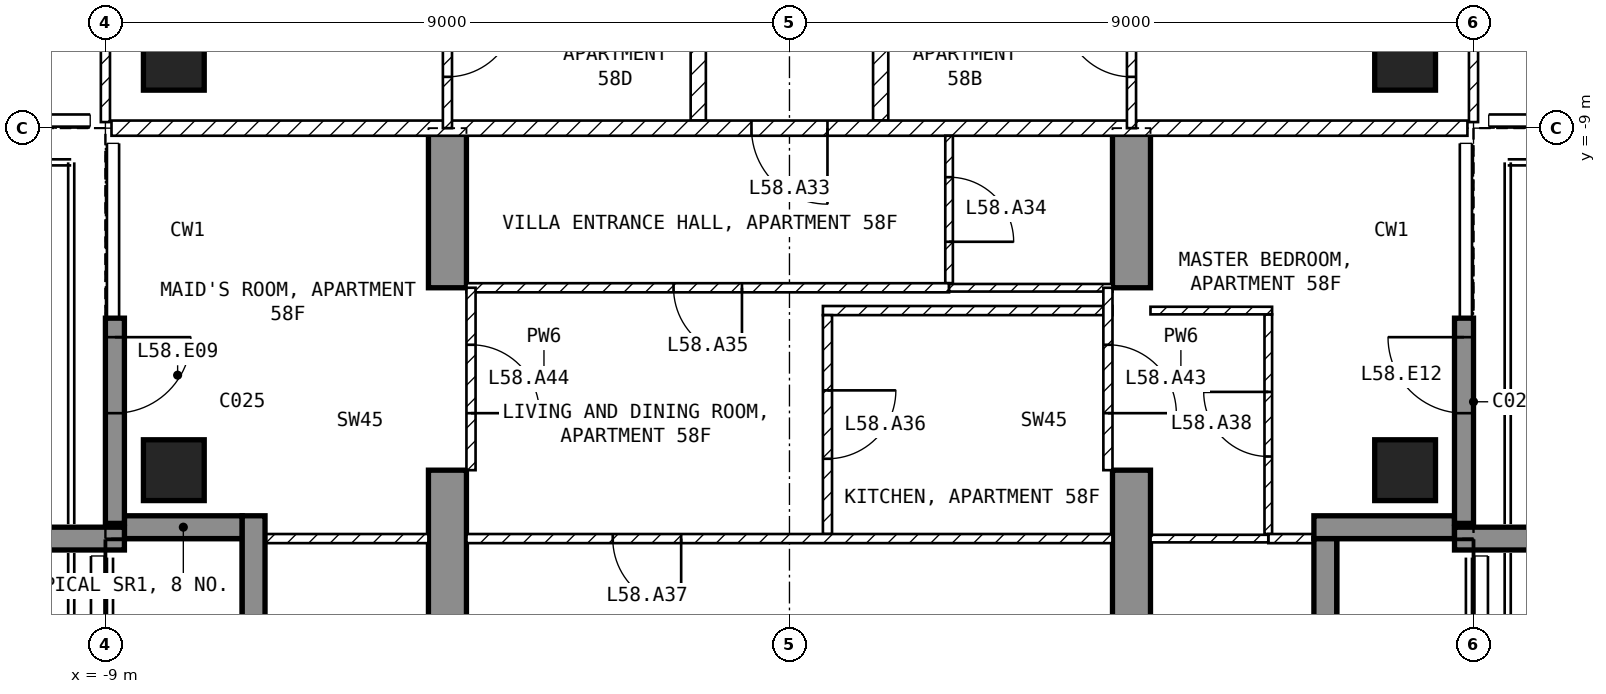
"""IFC4 building model, lengths in metres.
Left out: names, types, materials, properties, quantities, classifications, styles, units other than length and angle.
Written with IfcOpenShell. Run it as: python <this file> out.ifc"""

import sys

from ifc_helpers import new_model, si_unit, direction, frame, frame_2d, origin, origin_2d, place, context, subcontext, project, spatial, polyline, rectangle, outline, extrude, element, fill, save


model = new_model("IFC4")
c1 = context("Model", 3, precision=1e-05, world=origin(), true_north=direction((0.0, 1.0)))
c2 = subcontext(c1, "Body", "Model", "MODEL_VIEW")
j1 = project(units=[si_unit("LENGTHUNIT", "METRE"), si_unit("PLANEANGLEUNIT", "RADIAN")], contexts=[c1])
p1 = place(None, origin())
s1 = spatial("IfcSite", under=j1, at=p1, CompositionType="ELEMENT")
p2 = place(p1, origin())
s2 = spatial("IfcBuilding", under=s1, at=p2, CompositionType="ELEMENT")
p3 = place(p2, frame((0.0, 0.0, 232.5)))
s3 = spatial("IfcBuildingStorey", under=s2, at=p3, CompositionType="ELEMENT", Elevation=232.5)
for number, where, z_axis, x_axis in (
    (1, (-8.1, -13.5, -0.25), (0.0, 0.0, 1.0), (1.0, 0.0, 0.0)),
    (2, (-8.1, -8.1, -0.25), (0.0, 0.0, 1.0), (1.0, 0.0, 0.0)),
    (3, (8.1, -13.5, -0.25), (0.0, 0.0, 1.0), (1.0, 0.0, 0.0)),
    (4, (8.1, -8.1, -0.25), (0.0, 0.0, 1.0), (1.0, 0.0, 0.0)),
):
    element("IfcColumn", number, at=place(p3, frame(where, z_axis=z_axis, x_axis=x_axis)), inside=s3, PredefinedType="COLUMN", context=c2, shape_type="SweptSolid", body=[
        extrude(rectangle(XDim=0.8, YDim=0.8, at=origin_2d()), origin(), (0.0, 0.0, 1.0), 3.5),
    ])
for number, where, z_axis, x_axis in (
    (5, (-4.75, -16.7, -0.25), (1.0, 0.0, 0.0), (0.0, 1.0, 0.0)),
    (6, (4.25, -16.7, -0.25), (1.0, 0.0, 0.0), (0.0, 1.0, 0.0)),
):
    element("IfcWall", number, at=place(p3, frame(where, z_axis=z_axis, x_axis=x_axis)), inside=s3, PredefinedType="SHEAR", context=c2, shape_type="SweptSolid", body=[
        extrude(outline(polyline([(0.0, 0.0), (3.2, 0.0), (3.2, 2.65), (5.6, 2.65), (5.6, 0.0), (7.7, 0.0), (7.7, 3.5), (0.0, 3.5), (0.0, 0.0)])), origin(), (0.0, 0.0, 1.0), 0.5),
    ])
p4 = place(p3, frame((-8.875, -11.5, 0.0), z_axis=(0.0, 0.0, 1.0), x_axis=(0.0, -1.0, 0.0)))
e7 = element("IfcWall", 7, at=p4, inside=s3, PredefinedType="SOLIDWALL", context=c2, shape_type="SweptSolid", body=[
    extrude(rectangle(XDim=2.7, YDim=0.25, at=frame_2d((1.35, 0.0))), origin(), (0.0, 0.0, 1.0), 3.25),
])
p5 = place(p4, frame((0.25, 0.0, 0.0)))
e8 = element("IfcOpeningElement", 8, at=p5, cuts=e7, PredefinedType="OPENING", context=c2, shape_type="SweptSolid", body=[
    extrude(rectangle(XDim=1.0, YDim=2.4, at=frame_2d((0.5, 1.2))), frame((0.0, 0.135, 0.0), z_axis=(0.0, -1.0, 0.0), x_axis=(1.0, 0.0, 0.0)), (0.0, 0.0, 1.0), 0.27),
])
p6 = place(p3, frame((8.875, -14.2, 0.0), z_axis=(0.0, 0.0, 1.0), x_axis=(0.0, 1.0, 0.0)))
e9 = element("IfcWall", 9, at=p6, inside=s3, PredefinedType="SOLIDWALL", context=c2, shape_type="SweptSolid", body=[
    extrude(rectangle(XDim=2.7, YDim=0.25, at=frame_2d((1.35, 0.0))), origin(), (0.0, 0.0, 1.0), 3.25),
])
p7 = place(p6, frame((1.45, 0.0, 0.0)))
e10 = element("IfcOpeningElement", 10, at=p7, cuts=e9, PredefinedType="OPENING", context=c2, shape_type="SweptSolid", body=[
    extrude(rectangle(XDim=1.0, YDim=2.4, at=frame_2d((0.5, 1.2))), frame((0.0, 0.135, 0.0), z_axis=(0.0, -1.0, 0.0), x_axis=(1.0, 0.0, 0.0)), (0.0, 0.0, 1.0), 0.27),
])
p8 = place(p3, frame((7.05, -16.2, 0.0), z_axis=(0.0, 0.0, 1.0), x_axis=(0.0, 1.0, 0.0)))
e11 = element("IfcWall", 11, at=p8, inside=s3, PredefinedType="SOLIDWALL", context=c2, shape_type="SweptSolid", body=[
    extrude(rectangle(XDim=1.8, YDim=0.3, at=frame_2d((0.9, 0.0))), origin(), (0.0, 0.0, 1.0), 3.25),
])
p9 = place(p3, frame((6.9, -14.25, 0.0), z_axis=(0.0, 0.0, 1.0), x_axis=(1.0, 0.0, 0.0)))
e12 = element("IfcWall", 12, at=p9, inside=s3, PredefinedType="SOLIDWALL", context=c2, shape_type="SweptSolid", body=[
    extrude(rectangle(XDim=1.85, YDim=0.3, at=frame_2d((0.925, 0.0))), origin(), (0.0, 0.0, 1.0), 3.25),
])
p10 = place(p3, frame((-8.75, -14.25, 0.0), z_axis=(0.0, 0.0, 1.0), x_axis=(1.0, 0.0, 0.0)))
e13 = element("IfcWall", 13, at=p10, inside=s3, PredefinedType="SOLIDWALL", context=c2, shape_type="SweptSolid", body=[
    extrude(rectangle(XDim=1.55, YDim=0.3, at=frame_2d((0.775, 0.0))), origin(), (0.0, 0.0, 1.0), 3.25),
])
p11 = place(p3, frame((-7.05, -14.1, 0.0), z_axis=(0.0, 0.0, 1.0), x_axis=(0.0, -1.0, 0.0)))
e14 = element("IfcWall", 14, at=p11, inside=s3, PredefinedType="SOLIDWALL", context=c2, shape_type="SweptSolid", body=[
    extrude(rectangle(XDim=1.8, YDim=0.3, at=frame_2d((0.9, 0.0))), origin(), (0.0, 0.0, 1.0), 3.25),
])
for number, where, z_axis, x_axis in (
    (15, (-8.75, -14.4, 0.0), (0.0, 0.0, 1.0), (-1.0, 0.0, 0.0)),
    (16, (8.75, -14.4, 0.0), (0.0, 0.0, 1.0), (1.0, 0.0, 0.0)),
):
    element("IfcWall", number, at=place(p3, frame(where, z_axis=z_axis, x_axis=x_axis)), inside=s3, PredefinedType="SOLIDWALL", context=c2, shape_type="SweptSolid", body=[
        extrude(rectangle(XDim=2.95, YDim=0.3, at=frame_2d((1.475, 0.0))), origin(), (0.0, 0.0, 1.0), 3.25),
    ])
for number, where, z_axis, x_axis in (
    (17, (1.2, -4.6, 0.0), (0.0, 0.0, 1.0), (0.0, -1.0, 0.0)),
    (18, (-1.2, -8.9, 0.0), (0.0, 0.0, 1.0), (0.0, 1.0, 0.0)),
):
    element("IfcWall", number, at=place(p3, frame(where, z_axis=z_axis, x_axis=x_axis)), inside=s3, PredefinedType="PARTITIONING", context=c2, shape_type="SweptSolid", body=[
        extrude(rectangle(XDim=4.3, YDim=0.2, at=frame_2d((2.15, 0.0))), origin(), (0.0, 0.0, 1.0), 3.25),
    ])
p12 = place(p3, frame((8.92, -9.0, 0.0), z_axis=(0.0, 0.0, 1.0), x_axis=(-1.0, 0.0, 0.0)))
e19 = element("IfcWall", 19, at=p12, inside=s3, PredefinedType="PARTITIONING", context=c2, shape_type="SweptSolid", body=[
    extrude(rectangle(XDim=17.84, YDim=0.2, at=frame_2d((8.92, 0.0))), origin(), (0.0, 0.0, 1.0), 3.25),
])
p13 = place(p12, frame((8.42, 0.0, 0.0)))
e20 = element("IfcOpeningElement", 20, at=p13, cuts=e19, PredefinedType="OPENING", context=c2, shape_type="SweptSolid", body=[
    extrude(rectangle(XDim=1.0, YDim=2.1, at=frame_2d((0.5, 1.05))), frame((0.0, 0.11, 0.0), z_axis=(0.0, -1.0, 0.0), x_axis=(1.0, 0.0, 0.0)), (0.0, 0.0, 1.0), 0.22),
])
p14 = place(p3, frame((9.0, -8.92, 0.0), z_axis=(0.0, 0.0, 1.0), x_axis=(0.0, 1.0, 0.0)))
e21 = element("IfcWall", 21, at=p14, inside=s3, PredefinedType="PARTITIONING", context=c2, shape_type="SweptSolid", body=[
    extrude(rectangle(XDim=7.62, YDim=0.12, at=frame_2d((3.81, 0.0))), origin(), (0.0, 0.0, 1.0), 3.25),
])
p15 = place(p14, frame((6.32, 0.0, 0.0)))
e22 = element("IfcOpeningElement", 22, at=p15, cuts=e21, PredefinedType="OPENING", context=c2, shape_type="SweptSolid", body=[
    extrude(rectangle(XDim=0.9, YDim=2.1, at=frame_2d((0.45, 1.05))), frame((0.0, 0.07, 0.0), z_axis=(0.0, -1.0, 0.0), x_axis=(1.0, 0.0, 0.0)), (0.0, 0.0, 1.0), 0.14),
])
p16 = place(p3, frame((4.5, -9.0, 0.0), z_axis=(0.0, 0.0, 1.0), x_axis=(0.0, 1.0, 0.0)))
e23 = element("IfcWall", 23, at=p16, inside=s3, PredefinedType="PARTITIONING", context=c2, shape_type="SweptSolid", body=[
    extrude(rectangle(XDim=2.25, YDim=0.12, at=frame_2d((1.125, 0.0))), origin(), (0.0, 0.0, 1.0), 3.25),
])
p17 = place(p16, frame((0.675, 0.0, 0.0)))
e24 = element("IfcOpeningElement", 24, at=p17, cuts=e23, PredefinedType="OPENING", context=c2, shape_type="SweptSolid", body=[
    extrude(rectangle(XDim=0.9, YDim=2.1, at=frame_2d((0.45, 1.05))), frame((0.0, 0.07, 0.0), z_axis=(0.0, -1.0, 0.0), x_axis=(1.0, 0.0, 0.0)), (0.0, 0.0, 1.0), 0.14),
])
p18 = place(p3, frame((-9.0, -1.3, 0.0), z_axis=(0.0, 0.0, 1.0), x_axis=(0.0, -1.0, 0.0)))
e25 = element("IfcWall", 25, at=p18, inside=s3, PredefinedType="PARTITIONING", context=c2, shape_type="SweptSolid", body=[
    extrude(rectangle(XDim=7.62, YDim=0.12, at=frame_2d((3.81, 0.0))), origin(), (0.0, 0.0, 1.0), 3.25),
])
p19 = place(p18, frame((0.85, 0.0, 0.0)))
e26 = element("IfcOpeningElement", 26, at=p19, cuts=e25, PredefinedType="OPENING", context=c2, shape_type="SweptSolid", body=[
    extrude(rectangle(XDim=0.9, YDim=2.1, at=frame_2d((0.45, 1.05))), frame((0.0, 0.07, 0.0), z_axis=(0.0, -1.0, 0.0), x_axis=(1.0, 0.0, 0.0)), (0.0, 0.0, 1.0), 0.14),
])
p20 = place(p3, frame((-4.5, -6.75, 0.0), z_axis=(0.0, 0.0, 1.0), x_axis=(0.0, -1.0, 0.0)))
e27 = element("IfcWall", 27, at=p20, inside=s3, PredefinedType="PARTITIONING", context=c2, shape_type="SweptSolid", body=[
    extrude(rectangle(XDim=2.25, YDim=0.12, at=frame_2d((1.125, 0.0))), origin(), (0.0, 0.0, 1.0), 3.25),
])
p21 = place(p20, frame((0.675, 0.0, 0.0)))
e28 = element("IfcOpeningElement", 28, at=p21, cuts=e27, PredefinedType="OPENING", context=c2, shape_type="SweptSolid", body=[
    extrude(rectangle(XDim=0.9, YDim=2.1, at=frame_2d((0.45, 1.05))), frame((0.0, 0.07, 0.0), z_axis=(0.0, -1.0, 0.0), x_axis=(1.0, 0.0, 0.0)), (0.0, 0.0, 1.0), 0.14),
])
p22 = place(p3, frame((2.1, -9.1, 0.0), z_axis=(0.0, 0.0, 1.0), x_axis=(0.0, -1.0, 0.0)))
e29 = element("IfcWall", 29, at=p22, inside=s3, PredefinedType="PARTITIONING", context=c2, shape_type="SweptSolid", body=[
    extrude(rectangle(XDim=1.94, YDim=0.1, at=frame_2d((0.97, 0.0))), origin(), (0.0, 0.0, 1.0), 3.25),
])
p23 = place(p22, frame((0.545, 0.0, 0.0)))
e30 = element("IfcOpeningElement", 30, at=p23, cuts=e29, PredefinedType="OPENING", context=c2, shape_type="SweptSolid", body=[
    extrude(rectangle(XDim=0.85, YDim=2.1, at=frame_2d((0.425, 1.05))), frame((0.0, 0.06, 0.0), z_axis=(0.0, -1.0, 0.0), x_axis=(1.0, 0.0, 0.0)), (0.0, 0.0, 1.0), 0.12),
])
p24 = place(p3, frame((2.1, -11.1, 0.0), z_axis=(0.0, 0.0, 1.0), x_axis=(-1.0, 0.0, 0.0)))
e31 = element("IfcWall", 31, at=p24, inside=s3, PredefinedType="PARTITIONING", context=c2, shape_type="SweptSolid", body=[
    extrude(rectangle(XDim=6.35, YDim=0.12, at=frame_2d((3.175, 0.0))), origin(), (0.0, 0.0, 1.0), 3.25),
])
p25 = place(p24, frame((2.725, 0.0, 0.0)))
e32 = element("IfcOpeningElement", 32, at=p25, cuts=e31, PredefinedType="OPENING", context=c2, shape_type="SweptSolid", body=[
    extrude(rectangle(XDim=0.9, YDim=2.1, at=frame_2d((0.45, 1.05))), frame((0.0, 0.07, 0.0), z_axis=(0.0, -1.0, 0.0), x_axis=(1.0, 0.0, 0.0)), (0.0, 0.0, 1.0), 0.14),
])
p26 = place(p3, frame((4.25, -11.1, 0.0), z_axis=(0.0, 0.0, 1.0), x_axis=(-1.0, 0.0, 0.0)))
e33 = element("IfcWall", 33, at=p26, inside=s3, PredefinedType="PARTITIONING", context=c2, shape_type="SweptSolid", body=[
    extrude(rectangle(XDim=2.15, YDim=0.1, at=frame_2d((1.075, 0.0))), origin(), (0.0, 0.0, 1.0), 3.25),
])
p27 = place(p3, frame((4.25, -11.4, 0.0), z_axis=(0.0, 0.0, 1.0), x_axis=(-1.0, 0.0, 0.0)))
e34 = element("IfcWall", 34, at=p27, inside=s3, PredefinedType="PARTITIONING", context=c2, shape_type="SweptSolid", body=[
    extrude(rectangle(XDim=3.81, YDim=0.12, at=frame_2d((1.905, 0.0))), origin(), (0.0, 0.0, 1.0), 3.25),
])
p28 = place(p3, frame((0.5, -11.46, 0.0), z_axis=(0.0, 0.0, 1.0), x_axis=(0.0, -1.0, 0.0)))
e35 = element("IfcWall", 35, at=p28, inside=s3, PredefinedType="PARTITIONING", context=c2, shape_type="SweptSolid", body=[
    extrude(rectangle(XDim=2.88, YDim=0.12, at=frame_2d((1.44, 0.0))), origin(), (0.0, 0.0, 1.0), 3.25),
])
p29 = place(p28, frame((0.99, 0.0, 0.0)))
e36 = element("IfcOpeningElement", 36, at=p29, cuts=e35, PredefinedType="OPENING", context=c2, shape_type="SweptSolid", body=[
    extrude(rectangle(XDim=0.9, YDim=2.1, at=frame_2d((0.45, 1.05))), frame((0.0, 0.07, 0.0), z_axis=(0.0, -1.0, 0.0), x_axis=(1.0, 0.0, 0.0)), (0.0, 0.0, 1.0), 0.14),
])
p30 = place(p3, frame((4.25, -14.4, 0.0), z_axis=(0.0, 0.0, 1.0), x_axis=(-1.0, 0.0, 0.0)))
e37 = element("IfcWall", 37, at=p30, inside=s3, PredefinedType="PARTITIONING", context=c2, shape_type="SweptSolid", body=[
    extrude(rectangle(XDim=8.5, YDim=0.12, at=frame_2d((4.25, 0.0))), origin(), (0.0, 0.0, 1.0), 3.25),
])
p31 = place(p30, frame((5.675, 0.0, 0.0)))
e38 = element("IfcOpeningElement", 38, at=p31, cuts=e37, PredefinedType="OPENING", context=c2, shape_type="SweptSolid", body=[
    extrude(rectangle(XDim=0.9, YDim=2.1, at=frame_2d((0.45, 1.05))), frame((0.0, 0.07, 0.0), z_axis=(0.0, -1.0, 0.0), x_axis=(1.0, 0.0, 0.0)), (0.0, 0.0, 1.0), 0.14),
])
p32 = place(p3, frame((6.3, -14.34, 0.0), z_axis=(0.0, 0.0, 1.0), x_axis=(0.0, 1.0, 0.0)))
e39 = element("IfcWall", 39, at=p32, inside=s3, PredefinedType="PARTITIONING", context=c2, shape_type="SweptSolid", body=[
    extrude(rectangle(XDim=2.89, YDim=0.1, at=frame_2d((1.445, 0.0))), origin(), (0.0, 0.0, 1.0), 3.25),
])
p33 = place(p32, frame((1.02, 0.0, 0.0)))
e40 = element("IfcOpeningElement", 40, at=p33, cuts=e39, PredefinedType="OPENING", context=c2, shape_type="SweptSolid", body=[
    extrude(rectangle(XDim=0.85, YDim=2.1, at=frame_2d((0.425, 1.05))), frame((0.0, 0.06, 0.0), z_axis=(0.0, -1.0, 0.0), x_axis=(1.0, 0.0, 0.0)), (0.0, 0.0, 1.0), 0.12),
])
p34 = place(p3, frame((6.35, -11.4, 0.0), z_axis=(0.0, 0.0, 1.0), x_axis=(-1.0, 0.0, 0.0)))
e41 = element("IfcWall", 41, at=p34, inside=s3, PredefinedType="PARTITIONING", context=c2, shape_type="SweptSolid", body=[
    extrude(rectangle(XDim=1.6, YDim=0.1, at=frame_2d((0.8, 0.0))), origin(), (0.0, 0.0, 1.0), 3.25),
])
p35 = place(p3, frame((7.12, -14.4, 0.0), z_axis=(0.0, 0.0, 1.0), x_axis=(-1.0, 0.0, 0.0)))
e42 = element("IfcWall", 42, at=p35, inside=s3, PredefinedType="PARTITIONING", context=c2, shape_type="SweptSolid", body=[
    extrude(rectangle(XDim=0.82, YDim=0.12, at=frame_2d((0.41, 0.0))), origin(), (0.0, 0.0, 1.0), 3.25),
])
p36 = place(p3, frame((6.3, -14.4, 0.0), z_axis=(0.0, 0.0, 1.0), x_axis=(-1.0, 0.0, 0.0)))
e43 = element("IfcWall", 43, at=p36, inside=s3, PredefinedType="PARTITIONING", context=c2, shape_type="SweptSolid", body=[
    extrude(rectangle(XDim=1.55, YDim=0.1, at=frame_2d((0.775, 0.0))), origin(), (0.0, 0.0, 1.0), 3.25),
])
p37 = place(p3, frame((-4.75, -14.4, 0.0), z_axis=(0.0, 0.0, 1.0), x_axis=(-1.0, 0.0, 0.0)))
e44 = element("IfcWall", 44, at=p37, inside=s3, PredefinedType="PARTITIONING", context=c2, shape_type="SweptSolid", body=[
    extrude(rectangle(XDim=2.37, YDim=0.12, at=frame_2d((1.185, 0.0))), origin(), (0.0, 0.0, 1.0), 3.25),
])
p38 = place(p3, frame((4.19, -11.1, 0.0), z_axis=(0.0, 0.0, 1.0), x_axis=(0.0, -1.0, 0.0)))
e45 = element("IfcWall", 45, at=p38, inside=s3, PredefinedType="PARTITIONING", context=c2, shape_type="SweptSolid", body=[
    extrude(rectangle(XDim=2.4, YDim=0.12, at=frame_2d((1.2, 0.0))), origin(), (0.0, 0.0, 1.0), 2.4),
])
p39 = place(p38, frame((0.75, 0.0, 0.0)))
e46 = element("IfcOpeningElement", 46, at=p39, cuts=e45, PredefinedType="OPENING", context=c2, shape_type="SweptSolid", body=[
    extrude(rectangle(XDim=0.9, YDim=2.1, at=frame_2d((0.45, 1.05))), frame((0.0, 0.07, 0.0), z_axis=(0.0, -1.0, 0.0), x_axis=(1.0, 0.0, 0.0)), (0.0, 0.0, 1.0), 0.14),
])
p40 = place(p3, frame((-4.19, -11.1, 0.0), z_axis=(0.0, 0.0, 1.0), x_axis=(0.0, -1.0, 0.0)))
e47 = element("IfcWall", 47, at=p40, inside=s3, PredefinedType="PARTITIONING", context=c2, shape_type="SweptSolid", body=[
    extrude(rectangle(XDim=2.4, YDim=0.12, at=frame_2d((1.2, 0.0))), origin(), (0.0, 0.0, 1.0), 2.4),
])
p41 = place(p40, frame((0.75, 0.0, 0.0)))
e48 = element("IfcOpeningElement", 48, at=p41, cuts=e47, PredefinedType="OPENING", context=c2, shape_type="SweptSolid", body=[
    extrude(rectangle(XDim=0.9, YDim=2.1, at=frame_2d((0.45, 1.05))), frame((0.0, 0.07, 0.0), z_axis=(0.0, -1.0, 0.0), x_axis=(1.0, 0.0, 0.0)), (0.0, 0.0, 1.0), 0.14),
])
p42 = place(p5, origin())
e49 = element("IfcDoor", 49, at=p42, inside=s3, OperationType="SINGLE_SWING_LEFT", PredefinedType="DOOR", context=c2, shape_type="SweptSolid", body=[
    extrude(rectangle(XDim=1.0, YDim=2.4, at=frame_2d((0.5, 1.2))), frame((0.0, 0.025, 0.0), z_axis=(0.0, -1.0, 0.0), x_axis=(1.0, 0.0, 0.0)), (0.0, 0.0, 1.0), 0.05),
])
fill(e8, e49)
p43 = place(p7, origin())
e50 = element("IfcDoor", 50, at=p43, inside=s3, OperationType="SINGLE_SWING_RIGHT", PredefinedType="DOOR", context=c2, shape_type="SweptSolid", body=[
    extrude(rectangle(XDim=1.0, YDim=2.4, at=frame_2d((0.5, 1.2))), frame((0.0, 0.025, 0.0), z_axis=(0.0, -1.0, 0.0), x_axis=(1.0, 0.0, 0.0)), (0.0, 0.0, 1.0), 0.05),
])
fill(e10, e50)
p44 = place(p17, origin())
e51 = element("IfcDoor", 51, at=p44, inside=s3, OperationType="SINGLE_SWING_RIGHT", PredefinedType="DOOR", context=c2, shape_type="SweptSolid", body=[
    extrude(rectangle(XDim=0.9, YDim=2.1, at=frame_2d((0.45, 1.05))), frame((0.0, 0.025, 0.0), z_axis=(0.0, -1.0, 0.0), x_axis=(1.0, 0.0, 0.0)), (0.0, 0.0, 1.0), 0.05),
])
fill(e24, e51)
p45 = place(p21, origin())
e52 = element("IfcDoor", 52, at=p45, inside=s3, OperationType="SINGLE_SWING_LEFT", PredefinedType="DOOR", context=c2, shape_type="SweptSolid", body=[
    extrude(rectangle(XDim=0.9, YDim=2.1, at=frame_2d((0.45, 1.05))), frame((0.0, 0.025, 0.0), z_axis=(0.0, -1.0, 0.0), x_axis=(1.0, 0.0, 0.0)), (0.0, 0.0, 1.0), 0.05),
])
fill(e28, e52)
p46 = place(p13, origin())
e53 = element("IfcDoor", 53, at=p46, inside=s3, OperationType="SINGLE_SWING_LEFT", PredefinedType="DOOR", context=c2, shape_type="SweptSolid", body=[
    extrude(rectangle(XDim=1.0, YDim=2.1, at=frame_2d((0.5, 1.05))), frame((0.0, 0.025, 0.0), z_axis=(0.0, -1.0, 0.0), x_axis=(1.0, 0.0, 0.0)), (0.0, 0.0, 1.0), 0.05),
])
fill(e20, e53)
p47 = place(p23, origin())
e54 = element("IfcDoor", 54, at=p47, inside=s3, OperationType="SINGLE_SWING_RIGHT", PredefinedType="DOOR", context=c2, shape_type="SweptSolid", body=[
    extrude(rectangle(XDim=0.85, YDim=2.1, at=frame_2d((0.425, 1.05))), frame((0.0, 0.025, 0.0), z_axis=(0.0, -1.0, 0.0), x_axis=(1.0, 0.0, 0.0)), (0.0, 0.0, 1.0), 0.05),
])
fill(e30, e54)
p48 = place(p25, origin())
e55 = element("IfcDoor", 55, at=p48, inside=s3, OperationType="SINGLE_SWING_LEFT", PredefinedType="DOOR", context=c2, shape_type="SweptSolid", body=[
    extrude(rectangle(XDim=0.9, YDim=2.1, at=frame_2d((0.45, 1.05))), frame((0.0, 0.025, 0.0), z_axis=(0.0, -1.0, 0.0), x_axis=(1.0, 0.0, 0.0)), (0.0, 0.0, 1.0), 0.05),
])
fill(e32, e55)
p49 = place(p29, origin())
e56 = element("IfcDoor", 56, at=p49, inside=s3, OperationType="SINGLE_SWING_LEFT", PredefinedType="DOOR", context=c2, shape_type="SweptSolid", body=[
    extrude(rectangle(XDim=0.9, YDim=2.1, at=frame_2d((0.45, 1.05))), frame((0.0, 0.025, 0.0), z_axis=(0.0, -1.0, 0.0), x_axis=(1.0, 0.0, 0.0)), (0.0, 0.0, 1.0), 0.05),
])
fill(e36, e56)
p50 = place(p31, origin())
e57 = element("IfcDoor", 57, at=p50, inside=s3, OperationType="SINGLE_SWING_LEFT", PredefinedType="DOOR", context=c2, shape_type="SweptSolid", body=[
    extrude(rectangle(XDim=0.9, YDim=2.1, at=frame_2d((0.45, 1.05))), frame((0.0, 0.025, 0.0), z_axis=(0.0, -1.0, 0.0), x_axis=(1.0, 0.0, 0.0)), (0.0, 0.0, 1.0), 0.05),
])
fill(e38, e57)
p51 = place(p33, origin())
e58 = element("IfcDoor", 58, at=p51, inside=s3, OperationType="SINGLE_SWING_RIGHT", PredefinedType="DOOR", context=c2, shape_type="SweptSolid", body=[
    extrude(rectangle(XDim=0.85, YDim=2.1, at=frame_2d((0.425, 1.05))), frame((0.0, 0.025, 0.0), z_axis=(0.0, -1.0, 0.0), x_axis=(1.0, 0.0, 0.0)), (0.0, 0.0, 1.0), 0.05),
])
fill(e40, e58)
p52 = place(p39, origin())
e59 = element("IfcDoor", 59, at=p52, inside=s3, OperationType="SINGLE_SWING_RIGHT", PredefinedType="DOOR", context=c2, shape_type="SweptSolid", body=[
    extrude(rectangle(XDim=0.9, YDim=2.1, at=frame_2d((0.45, 1.05))), frame((0.0, 0.025, 0.0), z_axis=(0.0, -1.0, 0.0), x_axis=(1.0, 0.0, 0.0)), (0.0, 0.0, 1.0), 0.05),
])
fill(e46, e59)
p53 = place(p41, origin())
e60 = element("IfcDoor", 60, at=p53, inside=s3, OperationType="SINGLE_SWING_RIGHT", PredefinedType="DOOR", context=c2, shape_type="SweptSolid", body=[
    extrude(rectangle(XDim=0.9, YDim=2.1, at=frame_2d((0.45, 1.05))), frame((0.0, 0.025, 0.0), z_axis=(0.0, -1.0, 0.0), x_axis=(1.0, 0.0, 0.0)), (0.0, 0.0, 1.0), 0.05),
])
fill(e48, e60)
save(model, sys.argv[1])
